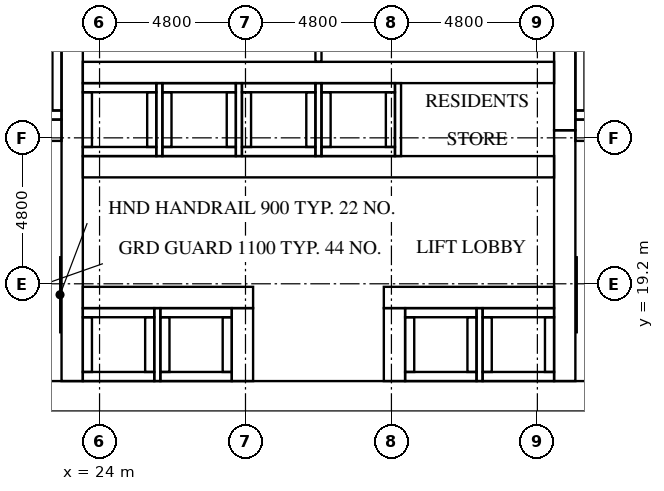
"""IFC4 building model, lengths in metres.
Left out: names, types, materials, properties, quantities, classifications, styles, units other than length and angle.
Written with IfcOpenShell. Run it as: python <this file> out.ifc"""

import sys

from ifc_helpers import new_model, si_unit, direction, frame, frame_2d, origin, place, context, subcontext, project, spatial, rectangle, extrude, element, fill, save


model = new_model("IFC4")
c1 = context("Model", 3, precision=1e-05, world=origin(), true_north=direction((0.0, 1.0)))
c2 = subcontext(c1, "Body", "Model", "MODEL_VIEW")
j1 = project(units=[si_unit("LENGTHUNIT", "METRE"), si_unit("PLANEANGLEUNIT", "RADIAN")], contexts=[c1])
p1 = place(None, origin())
s1 = spatial("IfcSite", under=j1, at=p1, CompositionType="ELEMENT")
p2 = place(p1, origin())
s2 = spatial("IfcBuilding", under=s1, at=p2, CompositionType="ELEMENT")
p3 = place(p2, origin())
s3 = spatial("IfcBuildingStorey", under=s2, at=p3, CompositionType="ELEMENT", Elevation=0.0)
p4 = place(p3, frame((15.0, 15.5, 0.0), z_axis=(0.0, 0.0, 1.0), x_axis=(1.0, 0.0, 0.0)))
e1 = element("IfcWall", 1, at=p4, inside=s3, PredefinedType="SHEAR", context=c2, shape_type="SweptSolid", body=[
    extrude(rectangle(XDim=32.4, YDim=1.0, at=frame_2d((16.2, 0.0))), origin(), (0.0, 0.0, 1.0), 5.7),
])
p5 = place(p4, frame((15.3, 0.0, 0.0)))
e2 = element("IfcOpeningElement", 2, at=p5, cuts=e1, PredefinedType="OPENING", context=c2, shape_type="SweptSolid", body=[
    extrude(rectangle(XDim=1.8, YDim=2.1, at=frame_2d((0.9, 1.05))), frame((0.0, 0.51, 0.0), z_axis=(0.0, -1.0, 0.0), x_axis=(1.0, 0.0, 0.0)), (0.0, 0.0, 1.0), 1.02),
])
p6 = place(p3, frame((23.1, 16.0, 0.0), z_axis=(0.0, 0.0, 1.0), x_axis=(0.0, 1.0, 0.0)))
e3 = element("IfcWall", 3, at=p6, inside=s3, PredefinedType="SHEAR", context=c2, shape_type="SweptSolid", body=[
    extrude(rectangle(XDim=20.8, YDim=0.7, at=frame_2d((10.4, 0.0))), origin(), (0.0, 0.0, 1.0), 5.7),
])
p7 = place(p3, frame((39.3, 16.0, 0.0), z_axis=(0.0, 0.0, 1.0), x_axis=(0.0, 1.0, 0.0)))
e4 = element("IfcWall", 4, at=p7, inside=s3, PredefinedType="SHEAR", context=c2, shape_type="SweptSolid", body=[
    extrude(rectangle(XDim=8.25, YDim=0.7, at=frame_2d((4.125, 0.0))), origin(), (0.0, 0.0, 1.0), 5.7),
])
p8 = place(p3, frame((39.3, 24.25, 0.0), z_axis=(0.0, 0.0, 1.0), x_axis=(0.0, 1.0, 0.0)))
e5 = element("IfcWall", 5, at=p8, inside=s3, PredefinedType="SHEAR", context=c2, shape_type="SweptSolid", body=[
    extrude(rectangle(XDim=3.5, YDim=0.7, at=frame_2d((1.75, 0.0))), origin(), (0.0, 0.0, 1.0), 5.7),
])
for number, where, z_axis, x_axis in (
    (6, (19.4, 24.25, 0.0), (0.0, 0.0, 1.0), (1.0, 0.0, 0.0)),
    (7, (39.65, 24.25, 0.0), (0.0, 0.0, 1.0), (1.0, 0.0, 0.0)),
):
    element("IfcWall", number, at=place(p3, frame(where, z_axis=z_axis, x_axis=x_axis)), inside=s3, PredefinedType="SHEAR", context=c2, shape_type="SweptSolid", body=[
        extrude(rectangle(XDim=3.35, YDim=0.7, at=frame_2d((1.675, 0.0))), origin(), (0.0, 0.0, 1.0), 5.7),
    ])
p9 = place(p3, frame((23.45, 18.75, 0.0), z_axis=(0.0, 0.0, 1.0), x_axis=(1.0, 0.0, 0.0)))
e8 = element("IfcWall", 8, at=p9, inside=s3, PredefinedType="SHEAR", context=c2, shape_type="SweptSolid", body=[
    extrude(rectangle(XDim=5.6, YDim=0.7, at=frame_2d((2.8, 0.0))), origin(), (0.0, 0.0, 1.0), 5.7),
])
p10 = place(p9, frame((0.625, 0.0, 0.0)))
e9 = element("IfcOpeningElement", 9, at=p10, cuts=e8, PredefinedType="OPENING", context=c2, shape_type="SweptSolid", body=[
    extrude(rectangle(XDim=1.1, YDim=2.1, at=frame_2d((0.55, 1.05))), frame((0.0, 0.36, 0.0), z_axis=(0.0, -1.0, 0.0), x_axis=(1.0, 0.0, 0.0)), (0.0, 0.0, 1.0), 0.72),
])
p11 = place(p9, frame((3.175, 0.0, 0.0)))
e10 = element("IfcOpeningElement", 10, at=p11, cuts=e8, PredefinedType="OPENING", context=c2, shape_type="SweptSolid", body=[
    extrude(rectangle(XDim=1.1, YDim=2.1, at=frame_2d((0.55, 1.05))), frame((0.0, 0.36, 0.0), z_axis=(0.0, -1.0, 0.0), x_axis=(1.0, 0.0, 0.0)), (0.0, 0.0, 1.0), 0.72),
])
p12 = place(p3, frame((33.35, 18.75, 0.0), z_axis=(0.0, 0.0, 1.0), x_axis=(1.0, 0.0, 0.0)))
e11 = element("IfcWall", 11, at=p12, inside=s3, PredefinedType="SHEAR", context=c2, shape_type="SweptSolid", body=[
    extrude(rectangle(XDim=5.6, YDim=0.7, at=frame_2d((2.8, 0.0))), origin(), (0.0, 0.0, 1.0), 5.7),
])
p13 = place(p12, frame((1.325, 0.0, 0.0)))
e12 = element("IfcOpeningElement", 12, at=p13, cuts=e11, PredefinedType="OPENING", context=c2, shape_type="SweptSolid", body=[
    extrude(rectangle(XDim=1.1, YDim=2.1, at=frame_2d((0.55, 1.05))), frame((0.0, 0.36, 0.0), z_axis=(0.0, -1.0, 0.0), x_axis=(1.0, 0.0, 0.0)), (0.0, 0.0, 1.0), 0.72),
])
p14 = place(p12, frame((3.875, 0.0, 0.0)))
e13 = element("IfcOpeningElement", 13, at=p14, cuts=e11, PredefinedType="OPENING", context=c2, shape_type="SweptSolid", body=[
    extrude(rectangle(XDim=1.1, YDim=2.1, at=frame_2d((0.55, 1.05))), frame((0.0, 0.36, 0.0), z_axis=(0.0, -1.0, 0.0), x_axis=(1.0, 0.0, 0.0)), (0.0, 0.0, 1.0), 0.72),
])
p15 = place(p3, frame((23.45, 23.05, 0.0), z_axis=(0.0, 0.0, 1.0), x_axis=(1.0, 0.0, 0.0)))
e14 = element("IfcWall", 14, at=p15, inside=s3, PredefinedType="SHEAR", context=c2, shape_type="SweptSolid", body=[
    extrude(rectangle(XDim=15.5, YDim=0.7, at=frame_2d((7.75, 0.0))), origin(), (0.0, 0.0, 1.0), 5.7),
])
p16 = place(p15, frame((0.658, 0.0, 0.0)))
e15 = element("IfcOpeningElement", 15, at=p16, cuts=e14, PredefinedType="OPENING", context=c2, shape_type="SweptSolid", body=[
    extrude(rectangle(XDim=1.1, YDim=2.1, at=frame_2d((0.55, 1.05))), frame((0.0, 0.36, 0.0), z_axis=(0.0, -1.0, 0.0), x_axis=(1.0, 0.0, 0.0)), (0.0, 0.0, 1.0), 0.72),
])
p17 = place(p15, frame((3.275, 0.0, 0.0)))
e16 = element("IfcOpeningElement", 16, at=p17, cuts=e14, PredefinedType="OPENING", context=c2, shape_type="SweptSolid", body=[
    extrude(rectangle(XDim=1.1, YDim=2.1, at=frame_2d((0.55, 1.05))), frame((0.0, 0.36, 0.0), z_axis=(0.0, -1.0, 0.0), x_axis=(1.0, 0.0, 0.0)), (0.0, 0.0, 1.0), 0.72),
])
p18 = place(p15, frame((5.892, 0.0, 0.0)))
e17 = element("IfcOpeningElement", 17, at=p18, cuts=e14, PredefinedType="OPENING", context=c2, shape_type="SweptSolid", body=[
    extrude(rectangle(XDim=1.1, YDim=2.1, at=frame_2d((0.55, 1.05))), frame((0.0, 0.36, 0.0), z_axis=(0.0, -1.0, 0.0), x_axis=(1.0, 0.0, 0.0)), (0.0, 0.0, 1.0), 0.72),
])
p19 = place(p15, frame((8.508, 0.0, 0.0)))
e18 = element("IfcOpeningElement", 18, at=p19, cuts=e14, PredefinedType="OPENING", context=c2, shape_type="SweptSolid", body=[
    extrude(rectangle(XDim=1.1, YDim=2.1, at=frame_2d((0.55, 1.05))), frame((0.0, 0.36, 0.0), z_axis=(0.0, -1.0, 0.0), x_axis=(1.0, 0.0, 0.0)), (0.0, 0.0, 1.0), 0.72),
])
p20 = place(p15, frame((12.483, 0.0, 0.0)))
e19 = element("IfcOpeningElement", 19, at=p20, cuts=e14, PredefinedType="OPENING", context=c2, shape_type="SweptSolid", body=[
    extrude(rectangle(XDim=1.0, YDim=2.1, at=frame_2d((0.5, 1.05))), frame((0.0, 0.36, 0.0), z_axis=(0.0, -1.0, 0.0), x_axis=(1.0, 0.0, 0.0)), (0.0, 0.0, 1.0), 0.72),
])
p21 = place(p3, frame((23.45, 26.15, 0.0), z_axis=(0.0, 0.0, 1.0), x_axis=(1.0, 0.0, 0.0)))
e20 = element("IfcWall", 20, at=p21, inside=s3, PredefinedType="SHEAR", context=c2, shape_type="SweptSolid", body=[
    extrude(rectangle(XDim=15.5, YDim=0.7, at=frame_2d((7.75, 0.0))), origin(), (0.0, 0.0, 1.0), 5.7),
])
for number, where, z_axis, x_axis in (
    (21, (28.7, 16.0, 0.0), (0.0, 0.0, 1.0), (0.0, 1.0, 0.0)),
    (22, (33.7, 16.0, 0.0), (0.0, 0.0, 1.0), (0.0, 1.0, 0.0)),
):
    element("IfcWall", number, at=place(p3, frame(where, z_axis=z_axis, x_axis=x_axis)), inside=s3, PredefinedType="SHEAR", context=c2, shape_type="SweptSolid", body=[
        extrude(rectangle(XDim=2.4, YDim=0.7, at=frame_2d((1.2, 0.0))), origin(), (0.0, 0.0, 1.0), 5.7),
    ])
for number, where, z_axis, x_axis in (
    (23, (23.45, 16.15, -1.8), (0.0, 0.0, 1.0), (1.0, 0.0, 0.0)),
    (24, (23.45, 18.25, -1.8), (0.0, 0.0, 1.0), (1.0, 0.0, 0.0)),
):
    element("IfcWall", number, at=place(p3, frame(where, z_axis=z_axis, x_axis=x_axis)), inside=s3, PredefinedType="SOLIDWALL", context=c2, shape_type="SweptSolid", body=[
        extrude(rectangle(XDim=2.35, YDim=0.3, at=frame_2d((1.175, 0.0))), origin(), (0.0, 0.0, 1.0), 1.8),
    ])
for number, where, z_axis, x_axis in (
    (25, (23.6, 16.3, -1.8), (0.0, 0.0, 1.0), (0.0, 1.0, 0.0)),
    (26, (25.65, 16.3, -1.8), (0.0, 0.0, 1.0), (0.0, 1.0, 0.0)),
):
    element("IfcWall", number, at=place(p3, frame(where, z_axis=z_axis, x_axis=x_axis)), inside=s3, PredefinedType="SOLIDWALL", context=c2, shape_type="SweptSolid", body=[
        extrude(rectangle(XDim=1.8, YDim=0.3, at=frame_2d((0.9, 0.0))), origin(), (0.0, 0.0, 1.0), 1.8),
    ])
for number, where, z_axis, x_axis in (
    (27, (26.0, 16.15, -1.8), (0.0, 0.0, 1.0), (1.0, 0.0, 0.0)),
    (28, (26.0, 18.25, -1.8), (0.0, 0.0, 1.0), (1.0, 0.0, 0.0)),
):
    element("IfcWall", number, at=place(p3, frame(where, z_axis=z_axis, x_axis=x_axis)), inside=s3, PredefinedType="SOLIDWALL", context=c2, shape_type="SweptSolid", body=[
        extrude(rectangle(XDim=2.35, YDim=0.3, at=frame_2d((1.175, 0.0))), origin(), (0.0, 0.0, 1.0), 1.8),
    ])
for number, where, z_axis, x_axis in (
    (29, (26.15, 16.3, -1.8), (0.0, 0.0, 1.0), (0.0, 1.0, 0.0)),
    (30, (28.2, 16.3, -1.8), (0.0, 0.0, 1.0), (0.0, 1.0, 0.0)),
):
    element("IfcWall", number, at=place(p3, frame(where, z_axis=z_axis, x_axis=x_axis)), inside=s3, PredefinedType="SOLIDWALL", context=c2, shape_type="SweptSolid", body=[
        extrude(rectangle(XDim=1.8, YDim=0.3, at=frame_2d((0.9, 0.0))), origin(), (0.0, 0.0, 1.0), 1.8),
    ])
for number, where, z_axis, x_axis in (
    (31, (34.05, 16.15, -1.8), (0.0, 0.0, 1.0), (1.0, 0.0, 0.0)),
    (32, (34.05, 18.25, -1.8), (0.0, 0.0, 1.0), (1.0, 0.0, 0.0)),
):
    element("IfcWall", number, at=place(p3, frame(where, z_axis=z_axis, x_axis=x_axis)), inside=s3, PredefinedType="SOLIDWALL", context=c2, shape_type="SweptSolid", body=[
        extrude(rectangle(XDim=2.35, YDim=0.3, at=frame_2d((1.175, 0.0))), origin(), (0.0, 0.0, 1.0), 1.8),
    ])
for number, where, z_axis, x_axis in (
    (33, (34.2, 16.3, -1.8), (0.0, 0.0, 1.0), (0.0, 1.0, 0.0)),
    (34, (36.25, 16.3, -1.8), (0.0, 0.0, 1.0), (0.0, 1.0, 0.0)),
):
    element("IfcWall", number, at=place(p3, frame(where, z_axis=z_axis, x_axis=x_axis)), inside=s3, PredefinedType="SOLIDWALL", context=c2, shape_type="SweptSolid", body=[
        extrude(rectangle(XDim=1.8, YDim=0.3, at=frame_2d((0.9, 0.0))), origin(), (0.0, 0.0, 1.0), 1.8),
    ])
for number, where, z_axis, x_axis in (
    (35, (36.6, 16.15, -1.8), (0.0, 0.0, 1.0), (1.0, 0.0, 0.0)),
    (36, (36.6, 18.25, -1.8), (0.0, 0.0, 1.0), (1.0, 0.0, 0.0)),
):
    element("IfcWall", number, at=place(p3, frame(where, z_axis=z_axis, x_axis=x_axis)), inside=s3, PredefinedType="SOLIDWALL", context=c2, shape_type="SweptSolid", body=[
        extrude(rectangle(XDim=2.35, YDim=0.3, at=frame_2d((1.175, 0.0))), origin(), (0.0, 0.0, 1.0), 1.8),
    ])
for number, where, z_axis, x_axis in (
    (37, (36.75, 16.3, -1.8), (0.0, 0.0, 1.0), (0.0, 1.0, 0.0)),
    (38, (38.8, 16.3, -1.8), (0.0, 0.0, 1.0), (0.0, 1.0, 0.0)),
):
    element("IfcWall", number, at=place(p3, frame(where, z_axis=z_axis, x_axis=x_axis)), inside=s3, PredefinedType="SOLIDWALL", context=c2, shape_type="SweptSolid", body=[
        extrude(rectangle(XDim=1.8, YDim=0.3, at=frame_2d((0.9, 0.0))), origin(), (0.0, 0.0, 1.0), 1.8),
    ])
for number, where, z_axis, x_axis in (
    (39, (23.45, 23.55, -1.8), (0.0, 0.0, 1.0), (1.0, 0.0, 0.0)),
    (40, (23.45, 25.65, -1.8), (0.0, 0.0, 1.0), (1.0, 0.0, 0.0)),
):
    element("IfcWall", number, at=place(p3, frame(where, z_axis=z_axis, x_axis=x_axis)), inside=s3, PredefinedType="SOLIDWALL", context=c2, shape_type="SweptSolid", body=[
        extrude(rectangle(XDim=2.417, YDim=0.3, at=frame_2d((1.208, 0.0))), origin(), (0.0, 0.0, 1.0), 1.8),
    ])
for number, where, z_axis, x_axis in (
    (41, (23.6, 23.7, -1.8), (0.0, 0.0, 1.0), (0.0, 1.0, 0.0)),
    (42, (25.717, 23.7, -1.8), (0.0, 0.0, 1.0), (0.0, 1.0, 0.0)),
):
    element("IfcWall", number, at=place(p3, frame(where, z_axis=z_axis, x_axis=x_axis)), inside=s3, PredefinedType="SOLIDWALL", context=c2, shape_type="SweptSolid", body=[
        extrude(rectangle(XDim=1.8, YDim=0.3, at=frame_2d((0.9, 0.0))), origin(), (0.0, 0.0, 1.0), 1.8),
    ])
for number, where, z_axis, x_axis in (
    (43, (26.067, 23.55, -1.8), (0.0, 0.0, 1.0), (1.0, 0.0, 0.0)),
    (44, (26.067, 25.65, -1.8), (0.0, 0.0, 1.0), (1.0, 0.0, 0.0)),
):
    element("IfcWall", number, at=place(p3, frame(where, z_axis=z_axis, x_axis=x_axis)), inside=s3, PredefinedType="SOLIDWALL", context=c2, shape_type="SweptSolid", body=[
        extrude(rectangle(XDim=2.417, YDim=0.3, at=frame_2d((1.208, 0.0))), origin(), (0.0, 0.0, 1.0), 1.8),
    ])
for number, where, z_axis, x_axis in (
    (45, (26.217, 23.7, -1.8), (0.0, 0.0, 1.0), (0.0, 1.0, 0.0)),
    (46, (28.333, 23.7, -1.8), (0.0, 0.0, 1.0), (0.0, 1.0, 0.0)),
):
    element("IfcWall", number, at=place(p3, frame(where, z_axis=z_axis, x_axis=x_axis)), inside=s3, PredefinedType="SOLIDWALL", context=c2, shape_type="SweptSolid", body=[
        extrude(rectangle(XDim=1.8, YDim=0.3, at=frame_2d((0.9, 0.0))), origin(), (0.0, 0.0, 1.0), 1.8),
    ])
for number, where, z_axis, x_axis in (
    (47, (28.683, 23.55, -1.8), (0.0, 0.0, 1.0), (1.0, 0.0, 0.0)),
    (48, (28.683, 25.65, -1.8), (0.0, 0.0, 1.0), (1.0, 0.0, 0.0)),
):
    element("IfcWall", number, at=place(p3, frame(where, z_axis=z_axis, x_axis=x_axis)), inside=s3, PredefinedType="SOLIDWALL", context=c2, shape_type="SweptSolid", body=[
        extrude(rectangle(XDim=2.417, YDim=0.3, at=frame_2d((1.208, 0.0))), origin(), (0.0, 0.0, 1.0), 1.8),
    ])
for number, where, z_axis, x_axis in (
    (49, (28.833, 23.7, -1.8), (0.0, 0.0, 1.0), (0.0, 1.0, 0.0)),
    (50, (30.95, 23.7, -1.8), (0.0, 0.0, 1.0), (0.0, 1.0, 0.0)),
):
    element("IfcWall", number, at=place(p3, frame(where, z_axis=z_axis, x_axis=x_axis)), inside=s3, PredefinedType="SOLIDWALL", context=c2, shape_type="SweptSolid", body=[
        extrude(rectangle(XDim=1.8, YDim=0.3, at=frame_2d((0.9, 0.0))), origin(), (0.0, 0.0, 1.0), 1.8),
    ])
for number, where, z_axis, x_axis in (
    (51, (31.3, 23.55, -1.8), (0.0, 0.0, 1.0), (1.0, 0.0, 0.0)),
    (52, (31.3, 25.65, -1.8), (0.0, 0.0, 1.0), (1.0, 0.0, 0.0)),
):
    element("IfcWall", number, at=place(p3, frame(where, z_axis=z_axis, x_axis=x_axis)), inside=s3, PredefinedType="SOLIDWALL", context=c2, shape_type="SweptSolid", body=[
        extrude(rectangle(XDim=2.417, YDim=0.3, at=frame_2d((1.208, 0.0))), origin(), (0.0, 0.0, 1.0), 1.8),
    ])
for number, where, z_axis, x_axis in (
    (53, (31.45, 23.7, -1.8), (0.0, 0.0, 1.0), (0.0, 1.0, 0.0)),
    (54, (33.567, 23.7, -1.8), (0.0, 0.0, 1.0), (0.0, 1.0, 0.0)),
):
    element("IfcWall", number, at=place(p3, frame(where, z_axis=z_axis, x_axis=x_axis)), inside=s3, PredefinedType="SOLIDWALL", context=c2, shape_type="SweptSolid", body=[
        extrude(rectangle(XDim=1.8, YDim=0.3, at=frame_2d((0.9, 0.0))), origin(), (0.0, 0.0, 1.0), 1.8),
    ])
p22 = place(p3, frame((19.4, 24.75, -1.8), z_axis=(0.0, 0.0, 1.0), x_axis=(1.0, 0.0, 0.0)))
e55 = element("IfcWall", 55, at=p22, inside=s3, PredefinedType="SOLIDWALL", context=c2, shape_type="SweptSolid", body=[
    extrude(rectangle(XDim=3.35, YDim=0.3, at=frame_2d((1.675, 0.0))), origin(), (0.0, 0.0, 1.0), 1.8),
])
p23 = place(p3, frame((22.6, 24.9, -1.8), z_axis=(0.0, 0.0, 1.0), x_axis=(0.0, 1.0, 0.0)))
e56 = element("IfcWall", 56, at=p23, inside=s3, PredefinedType="SOLIDWALL", context=c2, shape_type="SweptSolid", body=[
    extrude(rectangle(XDim=2.2, YDim=0.3, at=frame_2d((1.1, 0.0))), origin(), (0.0, 0.0, 1.0), 1.8),
])
p24 = place(p3, frame((39.65, 24.75, -1.8), z_axis=(0.0, 0.0, 1.0), x_axis=(1.0, 0.0, 0.0)))
e57 = element("IfcWall", 57, at=p24, inside=s3, PredefinedType="SOLIDWALL", context=c2, shape_type="SweptSolid", body=[
    extrude(rectangle(XDim=3.35, YDim=0.3, at=frame_2d((1.675, 0.0))), origin(), (0.0, 0.0, 1.0), 1.8),
])
p25 = place(p3, frame((39.8, 24.9, -1.8), z_axis=(0.0, 0.0, 1.0), x_axis=(0.0, 1.0, 0.0)))
e58 = element("IfcWall", 58, at=p25, inside=s3, PredefinedType="SOLIDWALL", context=c2, shape_type="SweptSolid", body=[
    extrude(rectangle(XDim=2.2, YDim=0.3, at=frame_2d((1.1, 0.0))), origin(), (0.0, 0.0, 1.0), 1.8),
])
for number, where, z_axis, x_axis in (
    (59, (25.967, 23.4, 0.0), (0.0, 0.0, 1.0), (0.0, 1.0, 0.0)),
    (60, (28.583, 23.4, 0.0), (0.0, 0.0, 1.0), (0.0, 1.0, 0.0)),
    (61, (31.2, 23.4, 0.0), (0.0, 0.0, 1.0), (0.0, 1.0, 0.0)),
    (62, (33.817, 23.4, 0.0), (0.0, 0.0, 1.0), (0.0, 1.0, 0.0)),
):
    element("IfcWall", number, at=place(p3, frame(where, z_axis=z_axis, x_axis=x_axis)), inside=s3, PredefinedType="SOLIDWALL", context=c2, shape_type="SweptSolid", body=[
        extrude(rectangle(XDim=2.4, YDim=0.2, at=frame_2d((1.2, 0.0))), origin(), (0.0, 0.0, 1.0), 5.7),
    ])
for number, where, z_axis, x_axis in (
    (63, (25.9, 16.0, 0.0), (0.0, 0.0, 1.0), (0.0, 1.0, 0.0)),
    (64, (36.5, 16.0, 0.0), (0.0, 0.0, 1.0), (0.0, 1.0, 0.0)),
):
    element("IfcWall", number, at=place(p3, frame(where, z_axis=z_axis, x_axis=x_axis)), inside=s3, PredefinedType="SOLIDWALL", context=c2, shape_type="SweptSolid", body=[
        extrude(rectangle(XDim=2.4, YDim=0.2, at=frame_2d((1.2, 0.0))), origin(), (0.0, 0.0, 1.0), 5.7),
    ])
p26 = place(p3, frame((31.2, 26.5, 0.0), z_axis=(0.0, 0.0, 1.0), x_axis=(0.0, 1.0, 0.0)))
e65 = element("IfcWall", 65, at=p26, inside=s3, PredefinedType="PARTITIONING", context=c2, shape_type="SweptSolid", body=[
    extrude(rectangle(XDim=2.4, YDim=0.2, at=frame_2d((1.2, 0.0))), origin(), (0.0, 0.0, 1.0), 5.7),
])
p27 = place(p10, origin())
e66 = element("IfcDoor", 66, at=p27, inside=s3, OperationType="DOUBLE_DOOR_SLIDING", PredefinedType="DOOR", context=c2, shape_type="SweptSolid", body=[
    extrude(rectangle(XDim=1.1, YDim=2.1, at=frame_2d((0.55, 1.05))), frame((0.0, 0.025, 0.0), z_axis=(0.0, -1.0, 0.0), x_axis=(1.0, 0.0, 0.0)), (0.0, 0.0, 1.0), 0.05),
])
fill(e9, e66)
p28 = place(p11, origin())
e67 = element("IfcDoor", 67, at=p28, inside=s3, OperationType="DOUBLE_DOOR_SLIDING", PredefinedType="DOOR", context=c2, shape_type="SweptSolid", body=[
    extrude(rectangle(XDim=1.1, YDim=2.1, at=frame_2d((0.55, 1.05))), frame((0.0, 0.025, 0.0), z_axis=(0.0, -1.0, 0.0), x_axis=(1.0, 0.0, 0.0)), (0.0, 0.0, 1.0), 0.05),
])
fill(e10, e67)
p29 = place(p13, origin())
e68 = element("IfcDoor", 68, at=p29, inside=s3, OperationType="DOUBLE_DOOR_SLIDING", PredefinedType="DOOR", context=c2, shape_type="SweptSolid", body=[
    extrude(rectangle(XDim=1.1, YDim=2.1, at=frame_2d((0.55, 1.05))), frame((0.0, 0.025, 0.0), z_axis=(0.0, -1.0, 0.0), x_axis=(1.0, 0.0, 0.0)), (0.0, 0.0, 1.0), 0.05),
])
fill(e12, e68)
p30 = place(p14, origin())
e69 = element("IfcDoor", 69, at=p30, inside=s3, OperationType="DOUBLE_DOOR_SLIDING", PredefinedType="DOOR", context=c2, shape_type="SweptSolid", body=[
    extrude(rectangle(XDim=1.1, YDim=2.1, at=frame_2d((0.55, 1.05))), frame((0.0, 0.025, 0.0), z_axis=(0.0, -1.0, 0.0), x_axis=(1.0, 0.0, 0.0)), (0.0, 0.0, 1.0), 0.05),
])
fill(e13, e69)
p31 = place(p16, origin())
e70 = element("IfcDoor", 70, at=p31, inside=s3, OperationType="DOUBLE_DOOR_SLIDING", PredefinedType="DOOR", context=c2, shape_type="SweptSolid", body=[
    extrude(rectangle(XDim=1.1, YDim=2.1, at=frame_2d((0.55, 1.05))), frame((0.0, 0.025, 0.0), z_axis=(0.0, -1.0, 0.0), x_axis=(1.0, 0.0, 0.0)), (0.0, 0.0, 1.0), 0.05),
])
fill(e15, e70)
p32 = place(p17, origin())
e71 = element("IfcDoor", 71, at=p32, inside=s3, OperationType="DOUBLE_DOOR_SLIDING", PredefinedType="DOOR", context=c2, shape_type="SweptSolid", body=[
    extrude(rectangle(XDim=1.1, YDim=2.1, at=frame_2d((0.55, 1.05))), frame((0.0, 0.025, 0.0), z_axis=(0.0, -1.0, 0.0), x_axis=(1.0, 0.0, 0.0)), (0.0, 0.0, 1.0), 0.05),
])
fill(e16, e71)
p33 = place(p18, origin())
e72 = element("IfcDoor", 72, at=p33, inside=s3, OperationType="DOUBLE_DOOR_SLIDING", PredefinedType="DOOR", context=c2, shape_type="SweptSolid", body=[
    extrude(rectangle(XDim=1.1, YDim=2.1, at=frame_2d((0.55, 1.05))), frame((0.0, 0.025, 0.0), z_axis=(0.0, -1.0, 0.0), x_axis=(1.0, 0.0, 0.0)), (0.0, 0.0, 1.0), 0.05),
])
fill(e17, e72)
p34 = place(p19, origin())
e73 = element("IfcDoor", 73, at=p34, inside=s3, OperationType="DOUBLE_DOOR_SLIDING", PredefinedType="DOOR", context=c2, shape_type="SweptSolid", body=[
    extrude(rectangle(XDim=1.1, YDim=2.1, at=frame_2d((0.55, 1.05))), frame((0.0, 0.025, 0.0), z_axis=(0.0, -1.0, 0.0), x_axis=(1.0, 0.0, 0.0)), (0.0, 0.0, 1.0), 0.05),
])
fill(e18, e73)
p35 = place(p5, frame((1.8, 0.0, 0.0), z_axis=(0.0, 0.0, 1.0), x_axis=(-1.0, 0.0, 0.0)))
e74 = element("IfcDoor", 74, at=p35, inside=s3, OperationType="DOUBLE_DOOR_SINGLE_SWING", PredefinedType="DOOR", context=c2, shape_type="SweptSolid", body=[
    extrude(rectangle(XDim=1.8, YDim=2.1, at=frame_2d((0.9, 1.05))), frame((0.0, 0.025, 0.0), z_axis=(0.0, -1.0, 0.0), x_axis=(1.0, 0.0, 0.0)), (0.0, 0.0, 1.0), 0.05),
])
fill(e2, e74)
p36 = place(p20, frame((1.0, 0.0, 0.0), z_axis=(0.0, 0.0, 1.0), x_axis=(-1.0, 0.0, 0.0)))
e75 = element("IfcDoor", 75, at=p36, inside=s3, OperationType="SINGLE_SWING_LEFT", PredefinedType="DOOR", context=c2, shape_type="SweptSolid", body=[
    extrude(rectangle(XDim=1.0, YDim=2.1, at=frame_2d((0.5, 1.05))), frame((0.0, 0.025, 0.0), z_axis=(0.0, -1.0, 0.0), x_axis=(1.0, 0.0, 0.0)), (0.0, 0.0, 1.0), 0.05),
])
fill(e19, e75)
save(model, sys.argv[1])
